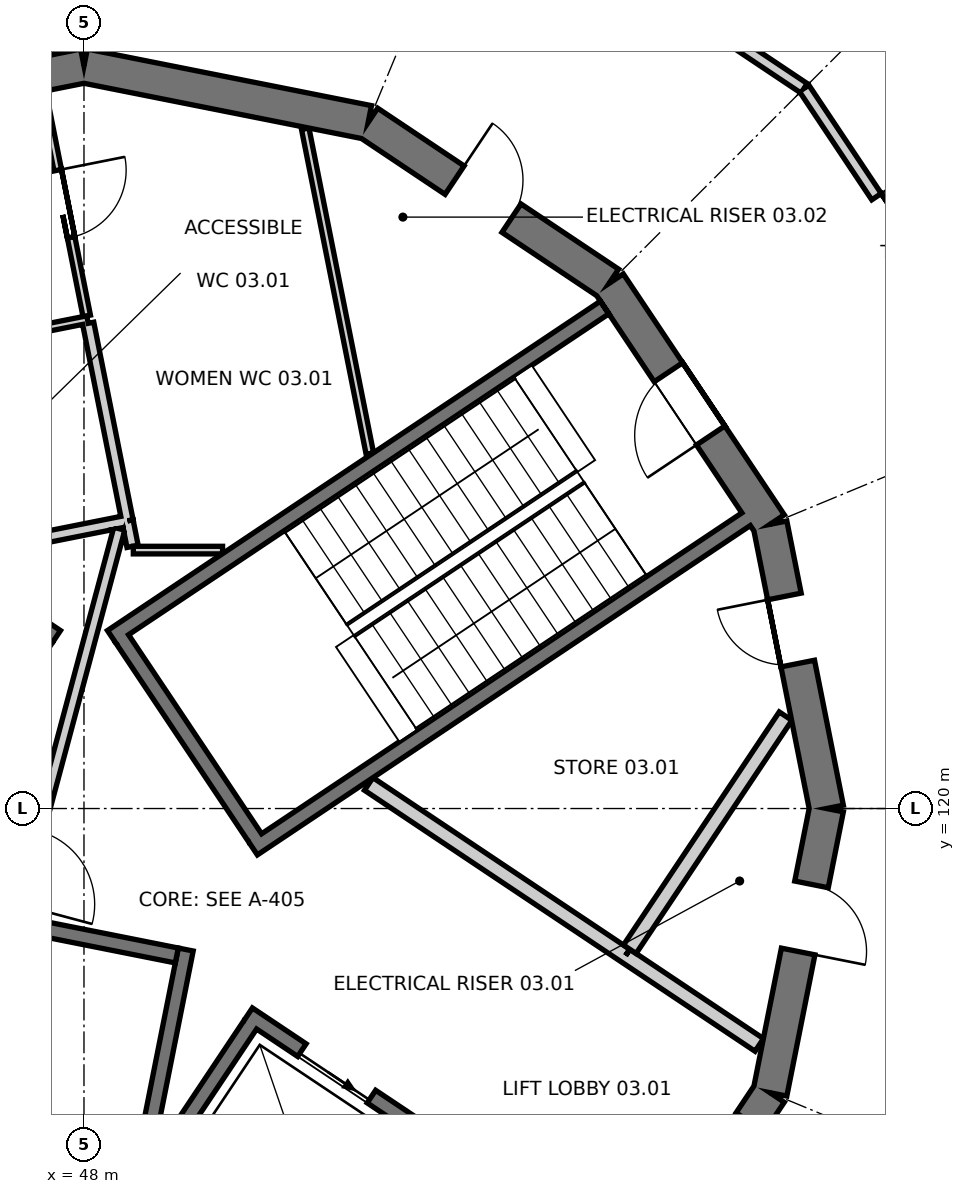
"""IFC4 building model, lengths in metres.
Left out: names, types, materials, properties, quantities, classifications, styles, units other than length and angle.
Written with IfcOpenShell. Run it as: python <this file> out.ifc"""

import sys

from ifc_helpers import new_model, si_unit, direction, frame, frame_2d, origin, place, context, subcontext, project, spatial, polyline, rectangle, outline, extrude, element, fill, save


model = new_model("IFC4")
c1 = context("Model", 3, precision=1e-05, world=origin(), true_north=direction((0.0, 1.0)))
c2 = subcontext(c1, "Body", "Model", "MODEL_VIEW")
j1 = project(units=[si_unit("LENGTHUNIT", "METRE"), si_unit("PLANEANGLEUNIT", "RADIAN")], contexts=[c1])
p1 = place(None, origin())
s1 = spatial("IfcSite", under=j1, at=p1, CompositionType="ELEMENT")
p2 = place(p1, origin())
s2 = spatial("IfcBuilding", under=s1, at=p2, CompositionType="ELEMENT")
p3 = place(p2, frame((0.0, 0.0, 15.6)))
s3 = spatial("IfcBuildingStorey", under=s2, at=p3, CompositionType="ELEMENT", Elevation=15.6)
p4 = place(p3, frame((57.771, 120.0, 0.0), z_axis=(0.0, 0.0, 1.0), x_axis=(-0.195069197673, 0.98078948206, 0.0)))
e1 = element("IfcWall", 1, at=p4, inside=s3, PredefinedType="SHEAR", context=c2, shape_type="SweptSolid", body=[
    extrude(outline(polyline([(-0.045, -0.225), (3.857, -0.225), (3.768, 0.225), (0.045, 0.225), (-0.045, -0.225)])), origin(), (0.0, 0.0, 1.0), 4.8),
])
p5 = place(p4, frame((1.945, 0.0, 0.0)))
e2 = element("IfcOpeningElement", 2, at=p5, cuts=e1, PredefinedType="OPENING", context=c2, shape_type="SweptSolid", body=[
    extrude(rectangle(XDim=0.9, YDim=2.1, at=frame_2d((0.45, 1.05))), frame((0.0, 0.235, 0.0), z_axis=(0.0, -1.0, 0.0), x_axis=(1.0, 0.0, 0.0)), (0.0, 0.0, 1.0), 0.47),
])
p6 = place(p3, frame((57.027, 123.739, 0.0), z_axis=(0.0, 0.0, 1.0), x_axis=(-0.555542277102, 0.83148829117, 0.0)))
e3 = element("IfcWall", 3, at=p6, inside=s3, PredefinedType="SHEAR", context=c2, shape_type="SweptSolid", body=[
    extrude(outline(polyline([(-0.045, -0.225), (3.857, -0.225), (3.768, 0.225), (0.045, 0.225), (-0.045, -0.225)])), origin(), (0.0, 0.0, 1.0), 4.8),
])
p7 = place(p6, frame((1.406, 0.0, 0.0)))
e4 = element("IfcOpeningElement", 4, at=p7, cuts=e3, PredefinedType="OPENING", context=c2, shape_type="SweptSolid", body=[
    extrude(rectangle(XDim=1.0, YDim=2.1, at=frame_2d((0.5, 1.05))), frame((0.0, 0.235, 0.0), z_axis=(0.0, -1.0, 0.0), x_axis=(1.0, 0.0, 0.0)), (0.0, 0.0, 1.0), 0.47),
])
p8 = place(p3, frame((54.909, 126.909, 0.0), z_axis=(0.0, 0.0, 1.0), x_axis=(-0.83148829117, 0.555542277102, 0.0)))
e5 = element("IfcWall", 5, at=p8, inside=s3, PredefinedType="SHEAR", context=c2, shape_type="SweptSolid", body=[
    extrude(outline(polyline([(-0.045, -0.225), (3.857, -0.225), (3.768, 0.225), (0.045, 0.225), (-0.045, -0.225)])), origin(), (0.0, 0.0, 1.0), 4.8),
])
p9 = place(p8, frame((1.545, 0.0, 0.0)))
e6 = element("IfcOpeningElement", 6, at=p9, cuts=e5, PredefinedType="OPENING", context=c2, shape_type="SweptSolid", body=[
    extrude(rectangle(XDim=0.9, YDim=2.1, at=frame_2d((0.45, 1.05))), frame((0.0, 0.235, 0.0), z_axis=(0.0, -1.0, 0.0), x_axis=(1.0, 0.0, 0.0)), (0.0, 0.0, 1.0), 0.47),
])
p10 = place(p3, frame((51.739, 129.027, 0.0), z_axis=(0.0, 0.0, 1.0), x_axis=(-0.98078948206, 0.195069197673, 0.0)))
e7 = element("IfcWall", 7, at=p10, inside=s3, PredefinedType="SHEAR", context=c2, shape_type="SweptSolid", body=[
    extrude(outline(polyline([(-0.045, -0.225), (3.857, -0.225), (3.768, 0.225), (0.045, 0.225), (-0.045, -0.225)])), origin(), (0.0, 0.0, 1.0), 4.8),
])
p11 = place(p3, frame((48.0, 129.771, 0.0), z_axis=(0.0, 0.0, 1.0), x_axis=(-0.98078948206, -0.195069197673, 0.0)))
e8 = element("IfcWall", 8, at=p11, inside=s3, PredefinedType="SHEAR", context=c2, shape_type="SweptSolid", body=[
    extrude(outline(polyline([(-0.045, -0.225), (3.857, -0.225), (3.768, 0.225), (0.045, 0.225), (-0.045, -0.225)])), origin(), (0.0, 0.0, 1.0), 4.8),
])
p12 = place(p11, frame((1.395, 0.0, 0.0)))
e9 = element("IfcOpeningElement", 9, at=p12, cuts=e8, PredefinedType="OPENING", context=c2, shape_type="SweptSolid", body=[
    extrude(rectangle(XDim=1.0, YDim=2.1, at=frame_2d((0.5, 1.05))), frame((0.0, 0.235, 0.0), z_axis=(0.0, -1.0, 0.0), x_axis=(1.0, 0.0, 0.0)), (0.0, 0.0, 1.0), 0.47),
])
p13 = place(p3, frame((54.909, 113.091, 0.0), z_axis=(0.0, 0.0, 1.0), x_axis=(0.555542277102, 0.83148829117, 0.0)))
e10 = element("IfcWall", 10, at=p13, inside=s3, PredefinedType="SHEAR", context=c2, shape_type="SweptSolid", body=[
    extrude(outline(polyline([(-0.045, -0.225), (3.857, -0.225), (3.768, 0.225), (0.045, 0.225), (-0.045, -0.225)])), origin(), (0.0, 0.0, 1.0), 4.8),
])
p14 = place(p13, frame((1.545, 0.0, 0.0)))
e11 = element("IfcOpeningElement", 11, at=p14, cuts=e10, PredefinedType="OPENING", context=c2, shape_type="SweptSolid", body=[
    extrude(rectangle(XDim=1.8, YDim=2.1, at=frame_2d((0.9, 1.05))), frame((0.0, 0.235, 0.0), z_axis=(0.0, -1.0, 0.0), x_axis=(1.0, 0.0, 0.0)), (0.0, 0.0, 1.0), 0.47),
])
p15 = place(p3, frame((57.027, 116.261, 0.0), z_axis=(0.0, 0.0, 1.0), x_axis=(0.195069197673, 0.98078948206, 0.0)))
e12 = element("IfcWall", 12, at=p15, inside=s3, PredefinedType="SHEAR", context=c2, shape_type="SweptSolid", body=[
    extrude(outline(polyline([(-0.045, -0.225), (3.857, -0.225), (3.768, 0.225), (0.045, 0.225), (-0.045, -0.225)])), origin(), (0.0, 0.0, 1.0), 4.8),
])
p16 = place(p15, frame((1.895, 0.0, 0.0)))
e13 = element("IfcOpeningElement", 13, at=p16, cuts=e12, PredefinedType="OPENING", context=c2, shape_type="SweptSolid", body=[
    extrude(rectangle(XDim=0.9, YDim=2.1, at=frame_2d((0.45, 1.05))), frame((0.0, 0.235, 0.0), z_axis=(0.0, -1.0, 0.0), x_axis=(1.0, 0.0, 0.0)), (0.0, 0.0, 1.0), 0.47),
])
p17 = place(p3, frame((48.365, 122.258, 0.0), z_axis=(0.0, 0.0, 1.0), x_axis=(0.831476803301, 0.555559470779, 0.0)))
e14 = element("IfcWall", 14, at=p17, inside=s3, PredefinedType="SHEAR", context=c2, shape_type="SweptSolid", body=[
    extrude(rectangle(XDim=7.8, YDim=0.2, at=frame_2d((3.9, 0.0))), origin(), (0.0, 0.0, 1.0), 4.8),
])
p18 = place(p3, frame((50.226, 119.473, 0.0), z_axis=(0.0, 0.0, 1.0), x_axis=(0.831486463828, 0.555545012102, 0.0)))
e15 = element("IfcWall", 15, at=p18, inside=s3, PredefinedType="SHEAR", context=c2, shape_type="SweptSolid", body=[
    extrude(rectangle(XDim=7.8, YDim=0.2, at=frame_2d((3.9, 0.0))), origin(), (0.0, 0.0, 1.0), 4.8),
])
p19 = place(p3, frame((50.253, 119.612, 0.0), z_axis=(0.0, 0.0, 1.0), x_axis=(-0.55555842186, 0.831477504146, 0.0)))
e16 = element("IfcWall", 16, at=p19, inside=s3, PredefinedType="SHEAR", context=c2, shape_type="SweptSolid", body=[
    extrude(rectangle(XDim=3.15, YDim=0.2, at=frame_2d((1.575, 0.0))), origin(), (0.0, 0.0, 1.0), 4.8),
])
p20 = place(p3, frame((47.635, 122.258, 0.0), z_axis=(0.0, 0.0, 1.0), x_axis=(-0.831476803301, 0.555559470779, 0.0)))
e17 = element("IfcWall", 17, at=p20, inside=s3, PredefinedType="SHEAR", context=c2, shape_type="SweptSolid", body=[
    extrude(rectangle(XDim=7.8, YDim=0.2, at=frame_2d((3.9, 0.0))), origin(), (0.0, 0.0, 1.0), 4.8),
])
p21 = place(p3, frame((49.339, 118.145, 0.0), z_axis=(0.0, 0.0, 1.0), x_axis=(-0.195092759861, -0.980784795483, 0.0)))
e18 = element("IfcWall", 18, at=p21, inside=s3, PredefinedType="SHEAR", context=c2, shape_type="SweptSolid", body=[
    extrude(rectangle(XDim=7.8, YDim=0.2, at=frame_2d((3.9, 0.0))), origin(), (0.0, 0.0, 1.0), 4.8),
])
p22 = place(p3, frame((46.132, 118.681, 0.0), z_axis=(0.0, 0.0, 1.0), x_axis=(0.980785830564, -0.195087556151, 0.0)))
e19 = element("IfcWall", 19, at=p22, inside=s3, PredefinedType="SHEAR", context=c2, shape_type="SweptSolid", body=[
    extrude(rectangle(XDim=3.15, YDim=0.2, at=frame_2d((1.575, 0.0))), origin(), (0.0, 0.0, 1.0), 4.8),
])
p23 = place(p3, frame((50.16, 117.293, 0.0), z_axis=(0.0, 0.0, 1.0), x_axis=(0.831479497601, -0.55555543834, 0.0)))
e20 = element("IfcWall", 20, at=p23, inside=s3, PredefinedType="SHEAR", context=c2, shape_type="SweptSolid", body=[
    extrude(rectangle(XDim=5.4, YDim=0.2, at=frame_2d((2.7, 0.0))), origin(), (0.0, 0.0, 1.0), 4.8),
])
p24 = place(p23, frame((0.85, 0.0, 0.0)))
e21 = element("IfcOpeningElement", 21, at=p24, cuts=e20, PredefinedType="OPENING", context=c2, shape_type="SweptSolid", body=[
    extrude(rectangle(XDim=1.1, YDim=2.1, at=frame_2d((0.55, 1.05))), frame((0.0, 0.11, 0.0), z_axis=(0.0, -1.0, 0.0), x_axis=(1.0, 0.0, 0.0)), (0.0, 0.0, 1.0), 0.22),
])
p25 = place(p23, frame((3.45, 0.0, 0.0)))
e22 = element("IfcOpeningElement", 22, at=p25, cuts=e20, PredefinedType="OPENING", context=c2, shape_type="SweptSolid", body=[
    extrude(rectangle(XDim=1.1, YDim=2.1, at=frame_2d((0.55, 1.05))), frame((0.0, 0.11, 0.0), z_axis=(0.0, -1.0, 0.0), x_axis=(1.0, 0.0, 0.0)), (0.0, 0.0, 1.0), 0.22),
])
p26 = place(p3, frame((50.188, 117.155, 0.0), z_axis=(0.0, 0.0, 1.0), x_axis=(-0.555559945722, -0.831476485963, 0.0)))
e23 = element("IfcWall", 23, at=p26, inside=s3, PredefinedType="SHEAR", context=c2, shape_type="SweptSolid", body=[
    extrude(rectangle(XDim=1.9, YDim=0.2, at=frame_2d((0.95, 0.0))), origin(), (0.0, 0.0, 1.0), 4.8),
])
p27 = place(p3, frame((55.126, 118.065, 0.0), z_axis=(0.0, 0.0, 1.0), x_axis=(-0.831495502265, 0.555531483998, 0.0)))
e24 = element("IfcWall", 24, at=p27, inside=s3, PredefinedType="SOLIDWALL", context=c2, shape_type="SweptSolid", body=[
    extrude(rectangle(XDim=4.065, YDim=0.2, at=frame_2d((2.033, 0.0))), origin(), (0.0, 0.0, 1.0), 4.52),
])
p28 = place(p3, frame((57.231, 121.215, 0.0), z_axis=(0.0, 0.0, 1.0), x_axis=(-0.555600969312, -0.831449074147, 0.0)))
e25 = element("IfcWall", 25, at=p28, inside=s3, PredefinedType="SOLIDWALL", context=c2, shape_type="SweptSolid", body=[
    extrude(rectangle(XDim=3.689, YDim=0.2, at=frame_2d((1.844, 0.0))), origin(), (0.0, 0.0, 1.0), 4.52),
])
p29 = place(p3, frame((56.885, 116.89, 0.0), z_axis=(0.0, 0.0, 1.0), x_axis=(-0.831446094913, 0.555605427667, 0.0)))
e26 = element("IfcWall", 26, at=p29, inside=s3, PredefinedType="SOLIDWALL", context=c2, shape_type="SweptSolid", body=[
    extrude(rectangle(XDim=2.115, YDim=0.2, at=frame_2d((1.058, 0.0))), origin(), (0.0, 0.0, 1.0), 4.52),
])
p30 = place(p3, frame((48.046, 126.433, 0.0), z_axis=(0.0, 0.0, 1.0), x_axis=(-0.980778805994, -0.195122868248, 0.0)))
e27 = element("IfcWall", 27, at=p30, inside=s3, PredefinedType="PARTITIONING", context=c2, shape_type="SweptSolid", body=[
    extrude(rectangle(XDim=2.6, YDim=0.1, at=frame_2d((1.3, 0.0))), origin(), (0.0, 0.0, 1.0), 4.52),
])
p31 = place(p30, frame((0.8, 0.0, 0.0)))
e28 = element("IfcOpeningElement", 28, at=p31, cuts=e27, PredefinedType="OPENING", context=c2, shape_type="SweptSolid", body=[
    extrude(rectangle(XDim=1.0, YDim=2.1, at=frame_2d((0.5, 1.05))), frame((0.0, 0.06, 0.0), z_axis=(0.0, -1.0, 0.0), x_axis=(1.0, 0.0, 0.0)), (0.0, 0.0, 1.0), 0.12),
])
p32 = place(p3, frame((47.449, 129.432, 0.0), z_axis=(0.0, 0.0, 1.0), x_axis=(0.195054549846, -0.980792395252, 0.0)))
e29 = element("IfcWall", 29, at=p32, inside=s3, PredefinedType="PARTITIONING", context=c2, shape_type="SweptSolid", body=[
    extrude(rectangle(XDim=3.008, YDim=0.1, at=frame_2d((1.504, 0.0))), origin(), (0.0, 0.0, 1.0), 4.52),
])
p33 = place(p32, frame((1.054, 0.0, 0.0)))
e30 = element("IfcOpeningElement", 30, at=p33, cuts=e29, PredefinedType="OPENING", context=c2, shape_type="SweptSolid", body=[
    extrude(rectangle(XDim=0.9, YDim=2.1, at=frame_2d((0.45, 1.05))), frame((0.0, 0.06, 0.0), z_axis=(0.0, -1.0, 0.0), x_axis=(1.0, 0.0, 0.0)), (0.0, 0.0, 1.0), 0.12),
])
p34 = place(p3, frame((48.056, 126.384, 0.0), z_axis=(0.0, 0.0, 1.0), x_axis=(0.195123903338, -0.980778600065, 0.0)))
e31 = element("IfcWall", 31, at=p34, inside=s3, PredefinedType="PARTITIONING", context=c2, shape_type="SweptSolid", body=[
    extrude(rectangle(XDim=2.65, YDim=0.15, at=frame_2d((1.325, 0.0))), origin(), (0.0, 0.0, 1.0), 4.52),
])
p35 = place(p3, frame((48.524, 123.775, 0.0), z_axis=(0.0, 0.0, 1.0), x_axis=(-0.980777249161, -0.195130693455, 0.0)))
e32 = element("IfcWall", 32, at=p35, inside=s3, PredefinedType="PARTITIONING", context=c2, shape_type="SweptSolid", body=[
    extrude(rectangle(XDim=2.287, YDim=0.15, at=frame_2d((1.144, 0.0))), origin(), (0.0, 0.0, 1.0), 4.52),
])
p36 = place(p3, frame((50.911, 128.943, 0.0), z_axis=(0.0, 0.0, 1.0), x_axis=(0.195113868301, -0.980780596462, 0.0)))
e33 = element("IfcWall", 33, at=p36, inside=s3, PredefinedType="PARTITIONING", context=c2, shape_type="SweptSolid", body=[
    extrude(rectangle(XDim=4.357, YDim=0.1, at=frame_2d((2.178, 0.0))), origin(), (0.0, 0.0, 1.0), 4.52),
])
p37 = place(p3, frame((49.823, 123.4, 0.0), z_axis=(0.0, 0.0, 1.0), x_axis=(-1.0, 0.0, 0.0)))
e34 = element("IfcWall", 34, at=p37, inside=s3, PredefinedType="PARTITIONING", context=c2, shape_type="SweptSolid", body=[
    extrude(rectangle(XDim=1.174, YDim=0.1, at=frame_2d((0.587, 0.0))), origin(), (0.0, 0.0, 1.0), 4.52),
])
p38 = place(p3, frame((48.639, 123.449, 0.0), z_axis=(0.0, 0.0, 1.0), x_axis=(-0.194880473507, 0.98082699853, 0.0)))
e35 = element("IfcWall", 35, at=p38, inside=s3, PredefinedType="PARTITIONING", context=c2, shape_type="SweptSolid", body=[
    extrude(rectangle(XDim=0.342, YDim=0.15, at=frame_2d((0.171, 0.0))), origin(), (0.0, 0.0, 1.0), 4.52),
])
p39 = place(p3, frame((47.102, 118.595, 0.0), z_axis=(0.0, 0.0, 1.0), x_axis=(0.258814124304, 0.9659271448, 0.0)))
e36 = element("IfcWall", 36, at=p39, inside=s3, PredefinedType="PARTITIONING", context=c2, shape_type="SweptSolid", body=[
    extrude(rectangle(XDim=5.265, YDim=0.15, at=frame_2d((2.632, 0.0))), origin(), (0.0, 0.0, 1.0), 4.52),
])
p40 = place(p39, frame((0.15, 0.0, 0.0)))
e37 = element("IfcOpeningElement", 37, at=p40, cuts=e36, PredefinedType="OPENING", context=c2, shape_type="SweptSolid", body=[
    extrude(rectangle(XDim=1.0, YDim=2.1, at=frame_2d((0.5, 1.05))), frame((0.0, 0.085, 0.0), z_axis=(0.0, -1.0, 0.0), x_axis=(1.0, 0.0, 0.0)), (0.0, 0.0, 1.0), 0.17),
])
p41 = place(p3, frame((53.128, 132.38, 0.0), z_axis=(0.0, 0.0, 1.0), x_axis=(0.831460742974, -0.555583506678, 0.0)))
e38 = element("IfcWall", 38, at=p41, inside=s3, PredefinedType="PARTITIONING", context=c2, shape_type="SweptSolid", body=[
    extrude(rectangle(XDim=5.228, YDim=0.15, at=frame_2d((2.614, 0.0))), origin(), (0.0, 0.0, 1.0), 4.52),
])
p42 = place(p3, frame((57.475, 129.475, 0.0), z_axis=(0.0, 0.0, 1.0), x_axis=(0.555583506678, -0.831460742974, 0.0)))
e39 = element("IfcWall", 39, at=p42, inside=s3, PredefinedType="PARTITIONING", context=c2, shape_type="SweptSolid", body=[
    extrude(rectangle(XDim=5.228, YDim=0.15, at=frame_2d((2.614, 0.0))), origin(), (0.0, 0.0, 1.0), 4.52),
])
p43 = place(p42, frame((1.714, 0.0, 0.0)))
e40 = element("IfcOpeningElement", 40, at=p43, cuts=e39, PredefinedType="OPENING", context=c2, shape_type="SweptSolid", body=[
    extrude(rectangle(XDim=1.8, YDim=2.1, at=frame_2d((0.9, 1.05))), frame((0.0, 0.085, 0.0), z_axis=(0.0, -1.0, 0.0), x_axis=(1.0, 0.0, 0.0)), (0.0, 0.0, 1.0), 0.17),
])
p44 = place(p7, origin())
e41 = element("IfcDoor", 41, at=p44, inside=s3, OperationType="SINGLE_SWING_LEFT", PredefinedType="DOOR", context=c2, shape_type="SweptSolid", body=[
    extrude(rectangle(XDim=1.0, YDim=2.1, at=frame_2d((0.5, 1.05))), frame((0.0, 0.025, 0.0), z_axis=(0.0, -1.0, 0.0), x_axis=(1.0, 0.0, 0.0)), (0.0, 0.0, 1.0), 0.05),
])
fill(e4, e41)
p45 = place(p24, origin())
e42 = element("IfcDoor", 42, at=p45, inside=s3, OperationType="SLIDING_TO_LEFT", PredefinedType="DOOR", context=c2, shape_type="SweptSolid", body=[
    extrude(rectangle(XDim=1.1, YDim=2.1, at=frame_2d((0.55, 1.05))), frame((0.0, 0.025, 0.0), z_axis=(0.0, -1.0, 0.0), x_axis=(1.0, 0.0, 0.0)), (0.0, 0.0, 1.0), 0.05),
])
fill(e21, e42)
p46 = place(p5, origin())
e43 = element("IfcDoor", 43, at=p46, inside=s3, OperationType="SINGLE_SWING_RIGHT", PredefinedType="DOOR", context=c2, shape_type="SweptSolid", body=[
    extrude(rectangle(XDim=0.9, YDim=2.1, at=frame_2d((0.45, 1.05))), frame((0.0, 0.025, 0.0), z_axis=(0.0, -1.0, 0.0), x_axis=(1.0, 0.0, 0.0)), (0.0, 0.0, 1.0), 0.05),
])
fill(e2, e43)
p47 = place(p16, frame((0.9, 0.0, 0.0), z_axis=(0.0, 0.0, 1.0), x_axis=(-1.0, 0.0, 0.0)))
e44 = element("IfcDoor", 44, at=p47, inside=s3, OperationType="SINGLE_SWING_RIGHT", PredefinedType="DOOR", context=c2, shape_type="SweptSolid", body=[
    extrude(rectangle(XDim=0.9, YDim=2.1, at=frame_2d((0.45, 1.05))), frame((0.0, 0.025, 0.0), z_axis=(0.0, -1.0, 0.0), x_axis=(1.0, 0.0, 0.0)), (0.0, 0.0, 1.0), 0.05),
])
fill(e13, e44)
p48 = place(p9, frame((0.9, 0.0, 0.0), z_axis=(0.0, 0.0, 1.0), x_axis=(-1.0, 0.0, 0.0)))
e45 = element("IfcDoor", 45, at=p48, inside=s3, OperationType="SINGLE_SWING_LEFT", PredefinedType="DOOR", context=c2, shape_type="SweptSolid", body=[
    extrude(rectangle(XDim=0.9, YDim=2.1, at=frame_2d((0.45, 1.05))), frame((0.0, 0.025, 0.0), z_axis=(0.0, -1.0, 0.0), x_axis=(1.0, 0.0, 0.0)), (0.0, 0.0, 1.0), 0.05),
])
fill(e6, e45)
p49 = place(p33, origin())
e46 = element("IfcDoor", 46, at=p49, inside=s3, OperationType="SINGLE_SWING_LEFT", PredefinedType="DOOR", context=c2, shape_type="SweptSolid", body=[
    extrude(rectangle(XDim=0.9, YDim=2.1, at=frame_2d((0.45, 1.05))), frame((0.0, 0.025, 0.0), z_axis=(0.0, -1.0, 0.0), x_axis=(1.0, 0.0, 0.0)), (0.0, 0.0, 1.0), 0.05),
])
fill(e30, e46)
p50 = place(p43, origin())
e47 = element("IfcDoor", 47, at=p50, inside=s3, OperationType="DOUBLE_DOOR_SINGLE_SWING", PredefinedType="DOOR", context=c2, shape_type="SweptSolid", body=[
    extrude(rectangle(XDim=1.8, YDim=2.1, at=frame_2d((0.9, 1.05))), frame((0.0, 0.025, 0.0), z_axis=(0.0, -1.0, 0.0), x_axis=(1.0, 0.0, 0.0)), (0.0, 0.0, 1.0), 0.05),
])
fill(e40, e47)
save(model, sys.argv[1])
